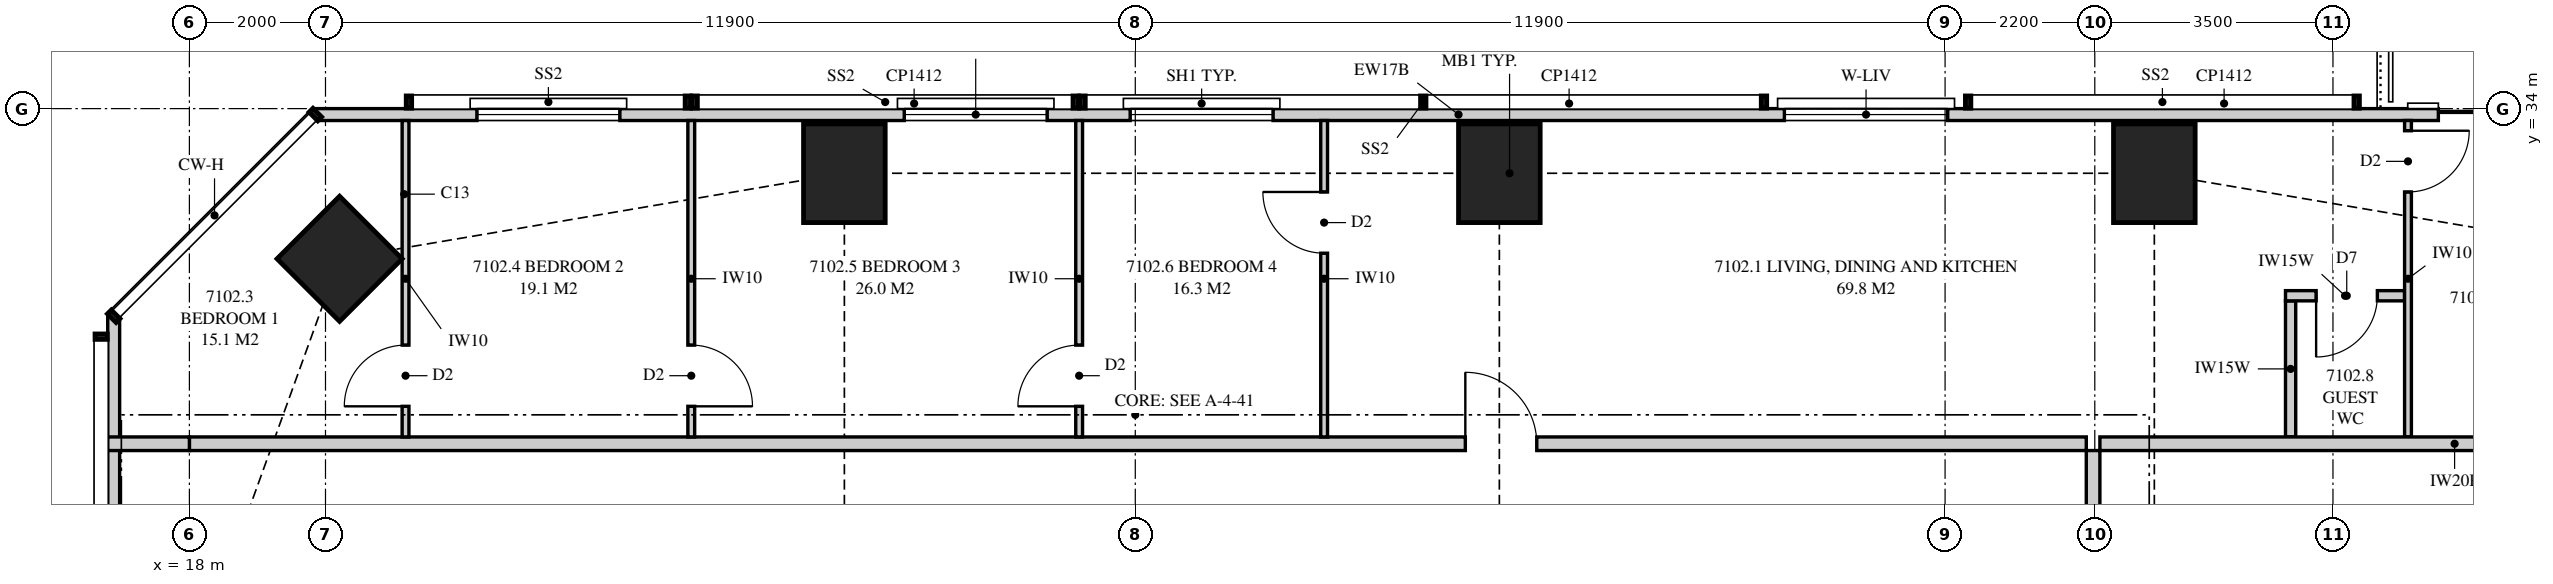
"""IFC4 building model, lengths in metres.
Left out: names, types, materials, properties, quantities, classifications, styles, units other than length and angle.
Written with IfcOpenShell. Run it as: python <this file> out.ifc"""

import sys

from ifc_helpers import new_model, si_unit, direction, frame, frame_2d, origin, origin_2d, place, context, subcontext, project, spatial, polyline, rectangle, outline, extrude, element, fill, save


model = new_model("IFC4")
c1 = context("Model", 3, precision=1e-05, world=origin(), true_north=direction((0.0, 1.0)))
c2 = subcontext(c1, "Body", "Model", "MODEL_VIEW")
j1 = project(units=[si_unit("LENGTHUNIT", "METRE"), si_unit("PLANEANGLEUNIT", "RADIAN")], contexts=[c1])
p1 = place(None, origin())
s1 = spatial("IfcSite", under=j1, at=p1, CompositionType="ELEMENT")
p2 = place(p1, origin())
s2 = spatial("IfcBuilding", under=s1, at=p2, CompositionType="ELEMENT")
p3 = place(p2, frame((0.0, 0.0, 259.95)))
s3 = spatial("IfcBuildingStorey", under=s2, at=p3, CompositionType="ELEMENT", Elevation=259.95)
for number, where, z_axis, x_axis in (
    (1, (46.875, 33.05, 0.0), (0.0, 0.0, 1.0), (0.0, 1.0, 0.0)),
    (2, (37.25, 33.05, 0.0), (0.0, 0.0, 1.0), (0.0, 1.0, 0.0)),
    (3, (27.625, 33.05, 0.0), (0.0, 0.0, 1.0), (0.0, 1.0, 0.0)),
):
    element("IfcColumn", number, at=place(p3, frame(where, z_axis=z_axis, x_axis=x_axis)), inside=s3, PredefinedType="COLUMN", context=c2, shape_type="SweptSolid", body=[
        extrude(rectangle(XDim=1.45, YDim=1.2, at=origin_2d()), origin(), (0.0, 0.0, 1.0), 3.9),
    ])
p4 = place(p3, frame((20.207, 31.793, 0.0), z_axis=(0.0, 0.0, 1.0), x_axis=(0.707106781187, 0.707106781187, 0.0)))
e4 = element("IfcColumn", 4, at=p4, inside=s3, PredefinedType="COLUMN", context=c2, shape_type="SweptSolid", body=[
    extrude(rectangle(XDim=1.3, YDim=1.3, at=origin_2d()), origin(), (0.0, 0.0, 1.0), 3.9),
])
p5 = place(p3, frame((53.449, 33.913, 0.0), z_axis=(0.0, 0.0, 1.0), x_axis=(-1.0, 0.0, 0.0)))
e5 = element("IfcWall", 5, at=p5, inside=s3, PredefinedType="SOLIDWALL", context=c2, shape_type="SweptSolid", body=[
    extrude(outline(polyline([(0.0, 0.0), (33.597, 0.0), (33.597, 3.66), (26.039, 3.66), (26.039, 2.7), (25.955, 2.7), (25.955, 3.66), (25.824, 3.66), (25.824, 2.7), (6.574, 2.7), (6.574, 3.66), (6.442, 3.66), (6.442, 2.7), (6.359, 2.7), (6.359, 3.66), (0.0, 3.66), (0.0, 0.0)])), frame((0.0, 0.087, 0.0), z_axis=(0.0, -1.0, 0.0), x_axis=(1.0, 0.0, 0.0)), (0.0, 0.0, 1.0), 0.175),
])
p6 = place(p5, frame((0.6, 0.0, 0.0)))
e6 = element("IfcOpeningElement", 6, at=p6, cuts=e5, PredefinedType="OPENING", context=c2, shape_type="SweptSolid", body=[
    extrude(rectangle(XDim=1.8, YDim=2.4, at=frame_2d((0.9, 1.2))), frame((0.0, 0.097, 0.0), z_axis=(0.0, -1.0, 0.0), x_axis=(1.0, 0.0, 0.0)), (0.0, 0.0, 1.0), 0.195),
])
p7 = place(p5, frame((9.61, 0.0, 0.4)))
e7 = element("IfcOpeningElement", 7, at=p7, cuts=e5, PredefinedType="OPENING", context=c2, shape_type="SweptSolid", body=[
    extrude(rectangle(XDim=2.4, YDim=2.0, at=frame_2d((1.2, 1.0))), frame((0.0, 0.097, 0.0), z_axis=(0.0, -1.0, 0.0), x_axis=(1.0, 0.0, 0.0)), (0.0, 0.0, 1.0), 0.195),
])
p8 = place(p5, frame((19.524, 0.0, 0.4)))
e8 = element("IfcOpeningElement", 8, at=p8, cuts=e5, PredefinedType="OPENING", context=c2, shape_type="SweptSolid", body=[
    extrude(rectangle(XDim=2.1, YDim=2.25, at=frame_2d((1.05, 1.125))), frame((0.0, 0.097, 0.0), z_axis=(0.0, -1.0, 0.0), x_axis=(1.0, 0.0, 0.0)), (0.0, 0.0, 1.0), 0.195),
])
p9 = place(p5, frame((22.844, 0.0, 0.4)))
e9 = element("IfcOpeningElement", 9, at=p9, cuts=e5, PredefinedType="OPENING", context=c2, shape_type="SweptSolid", body=[
    extrude(rectangle(XDim=2.1, YDim=2.25, at=frame_2d((1.05, 1.125))), frame((0.0, 0.097, 0.0), z_axis=(0.0, -1.0, 0.0), x_axis=(1.0, 0.0, 0.0)), (0.0, 0.0, 1.0), 0.195),
])
p10 = place(p5, frame((29.123, 0.0, 0.4)))
e10 = element("IfcOpeningElement", 10, at=p10, cuts=e5, PredefinedType="OPENING", context=c2, shape_type="SweptSolid", body=[
    extrude(rectangle(XDim=2.1, YDim=2.25, at=frame_2d((1.05, 1.125))), frame((0.0, 0.097, 0.0), z_axis=(0.0, -1.0, 0.0), x_axis=(1.0, 0.0, 0.0)), (0.0, 0.0, 1.0), 0.195),
])
p11 = place(p3, frame((16.887, 30.949, 0.0), z_axis=(0.0, 0.0, 1.0), x_axis=(0.0, -1.0, 0.0)))
e11 = element("IfcWall", 11, at=p11, inside=s3, PredefinedType="SOLIDWALL", context=c2, shape_type="SweptSolid", body=[
    extrude(outline(polyline([(0.0, 0.0), (27.897, 0.0), (27.897, 3.66), (18.148, 3.66), (18.148, 2.7), (18.125, 2.7), (18.125, 3.66), (17.949, 3.66), (17.949, 2.7), (5.949, 2.7), (5.949, 3.66), (0.0, 3.66), (0.0, 0.0)])), frame((0.0, 0.087, 0.0), z_axis=(0.0, -1.0, 0.0), x_axis=(1.0, 0.0, 0.0)), (0.0, 0.0, 1.0), 0.175),
])
p12 = place(p11, frame((11.849, 0.0, 0.4)))
e12 = element("IfcOpeningElement", 12, at=p12, cuts=e11, PredefinedType="OPENING", context=c2, shape_type="SweptSolid", body=[
    extrude(rectangle(XDim=1.2, YDim=2.0, at=frame_2d((0.6, 1.0))), frame((0.0, 0.097, 0.0), z_axis=(0.0, -1.0, 0.0), x_axis=(1.0, 0.0, 0.0)), (0.0, 0.0, 1.0), 0.195),
])
p13 = place(p3, frame((18.0, 29.075, 0.0), z_axis=(0.0, 0.0, 1.0), x_axis=(1.0, 0.0, 0.0)))
e13 = element("IfcWall", 13, at=p13, inside=s3, PredefinedType="PARTITIONING", context=c2, shape_type="SweptSolid", body=[
    extrude(outline(polyline([(0.0, 0.0), (27.875, 0.0), (27.875, 3.66), (27.875, 3.06), (27.565, 3.06), (27.565, 3.66), (20.56, 3.66), (20.56, 3.06), (17.94, 3.06), (17.94, 3.66), (10.935, 3.66), (10.935, 3.06), (8.315, 3.06), (8.315, 3.66), (2.192, 3.66), (2.192, 2.7), (0.256, 2.7), (0.256, 3.66), (0.0, 3.66), (0.0, 0.0)])), frame((0.0, 0.1, 0.0), z_axis=(0.0, -1.0, 0.0), x_axis=(1.0, 0.0, 0.0)), (0.0, 0.0, 1.0), 0.2),
])
p14 = place(p13, frame((18.75, 0.0, 0.0)))
e14 = element("IfcOpeningElement", 14, at=p14, cuts=e13, PredefinedType="OPENING", context=c2, shape_type="SweptSolid", body=[
    extrude(rectangle(XDim=1.05, YDim=2.2, at=frame_2d((0.525, 1.1))), frame((0.0, 0.11, 0.0), z_axis=(0.0, -1.0, 0.0), x_axis=(1.0, 0.0, 0.0)), (0.0, 0.0, 1.0), 0.22),
])
p15 = place(p3, frame((21.176, 33.825, 0.0), z_axis=(0.0, 0.0, 1.0), x_axis=(0.0, -1.0, 0.0)))
e15 = element("IfcWall", 15, at=p15, inside=s3, PredefinedType="PARTITIONING", context=c2, shape_type="SweptSolid", body=[
    extrude(outline(polyline([(0.0, 0.0), (4.65, 0.0), (4.65, 3.66), (2.74, 3.66), (2.74, 2.7), (0.996, 2.7), (0.996, 3.66), (0.0, 3.66), (0.0, 0.0)])), frame((0.0, 0.05, 0.0), z_axis=(0.0, -1.0, 0.0), x_axis=(1.0, 0.0, 0.0)), (0.0, 0.0, 1.0), 0.1),
])
p16 = place(p15, frame((3.3, 0.0, 0.0)))
e16 = element("IfcOpeningElement", 16, at=p16, cuts=e15, PredefinedType="OPENING", context=c2, shape_type="SweptSolid", body=[
    extrude(rectangle(XDim=0.9, YDim=2.1, at=frame_2d((0.45, 1.05))), frame((0.0, 0.06, 0.0), z_axis=(0.0, -1.0, 0.0), x_axis=(1.0, 0.0, 0.0)), (0.0, 0.0, 1.0), 0.12),
])
p17 = place(p3, frame((25.375, 33.825, 0.0), z_axis=(0.0, 0.0, 1.0), x_axis=(0.0, -1.0, 0.0)))
e17 = element("IfcWall", 17, at=p17, inside=s3, PredefinedType="PARTITIONING", context=c2, shape_type="SweptSolid", body=[
    extrude(outline(polyline([(0.0, 0.0), (4.65, 0.0), (4.65, 3.66), (2.029, 3.66), (2.029, 2.7), (0.284, 2.7), (0.284, 3.66), (0.0, 3.66), (0.0, 0.0)])), frame((0.0, 0.05, 0.0), z_axis=(0.0, -1.0, 0.0), x_axis=(1.0, 0.0, 0.0)), (0.0, 0.0, 1.0), 0.1),
])
p18 = place(p17, frame((3.3, 0.0, 0.0)))
e18 = element("IfcOpeningElement", 18, at=p18, cuts=e17, PredefinedType="OPENING", context=c2, shape_type="SweptSolid", body=[
    extrude(rectangle(XDim=0.9, YDim=2.1, at=frame_2d((0.45, 1.05))), frame((0.0, 0.06, 0.0), z_axis=(0.0, -1.0, 0.0), x_axis=(1.0, 0.0, 0.0)), (0.0, 0.0, 1.0), 0.12),
])
p19 = place(p3, frame((31.075, 33.825, 0.0), z_axis=(0.0, 0.0, 1.0), x_axis=(0.0, -1.0, 0.0)))
e19 = element("IfcWall", 19, at=p19, inside=s3, PredefinedType="PARTITIONING", context=c2, shape_type="SweptSolid", body=[
    extrude(outline(polyline([(0.0, 0.0), (4.65, 0.0), (4.65, 3.66), (1.635, 3.66), (1.635, 2.7), (0.0, 2.7), (0.0, 3.66), (0.0, 0.0)])), frame((0.0, 0.05, 0.0), z_axis=(0.0, -1.0, 0.0), x_axis=(1.0, 0.0, 0.0)), (0.0, 0.0, 1.0), 0.1),
])
p20 = place(p19, frame((3.3, 0.0, 0.0)))
e20 = element("IfcOpeningElement", 20, at=p20, cuts=e19, PredefinedType="OPENING", context=c2, shape_type="SweptSolid", body=[
    extrude(rectangle(XDim=0.9, YDim=2.1, at=frame_2d((0.45, 1.05))), frame((0.0, 0.06, 0.0), z_axis=(0.0, -1.0, 0.0), x_axis=(1.0, 0.0, 0.0)), (0.0, 0.0, 1.0), 0.12),
])
p21 = place(p3, frame((34.675, 33.825, 0.0), z_axis=(0.0, 0.0, 1.0), x_axis=(0.0, -1.0, 0.0)))
e21 = element("IfcWall", 21, at=p21, inside=s3, PredefinedType="PARTITIONING", context=c2, shape_type="SweptSolid", body=[
    extrude(outline(polyline([(0.0, 0.0), (4.65, 0.0), (4.65, 3.66), (1.635, 3.66), (1.635, 2.7), (0.0, 2.7), (0.0, 3.66), (0.0, 0.0)])), frame((0.0, 0.05, 0.0), z_axis=(0.0, -1.0, 0.0), x_axis=(1.0, 0.0, 0.0)), (0.0, 0.0, 1.0), 0.1),
])
p22 = place(p21, frame((1.05, 0.0, 0.0)))
e22 = element("IfcOpeningElement", 22, at=p22, cuts=e21, PredefinedType="OPENING", context=c2, shape_type="SweptSolid", body=[
    extrude(rectangle(XDim=0.9, YDim=2.1, at=frame_2d((0.45, 1.05))), frame((0.0, 0.06, 0.0), z_axis=(0.0, -1.0, 0.0), x_axis=(1.0, 0.0, 0.0)), (0.0, 0.0, 1.0), 0.12),
])
p23 = place(p3, frame((50.603, 33.825, 0.0), z_axis=(0.0, 0.0, 1.0), x_axis=(0.0, -1.0, 0.0)))
e23 = element("IfcWall", 23, at=p23, inside=s3, PredefinedType="PARTITIONING", context=c2, shape_type="SweptSolid", body=[
    extrude(outline(polyline([(0.0, 0.0), (4.65, 0.0), (4.65, 3.66), (2.279, 3.66), (2.279, 2.7), (0.534, 2.7), (0.534, 3.66), (0.0, 3.66), (0.0, 0.0)])), frame((0.0, 0.05, 0.0), z_axis=(0.0, -1.0, 0.0), x_axis=(1.0, 0.0, 0.0)), (0.0, 0.0, 1.0), 0.1),
])
p24 = place(p23, frame((0.15, 0.0, 0.0)))
e24 = element("IfcOpeningElement", 24, at=p24, cuts=e23, PredefinedType="OPENING", context=c2, shape_type="SweptSolid", body=[
    extrude(rectangle(XDim=0.9, YDim=2.1, at=frame_2d((0.45, 1.05))), frame((0.0, 0.06, 0.0), z_axis=(0.0, -1.0, 0.0), x_axis=(1.0, 0.0, 0.0)), (0.0, 0.0, 1.0), 0.12),
])
p25 = place(p3, frame((16.8, 29.075, 0.0), z_axis=(0.0, 0.0, 1.0), x_axis=(1.0, 0.0, 0.0)))
e25 = element("IfcWall", 25, at=p25, inside=s3, PredefinedType="PARTITIONING", context=c2, shape_type="SweptSolid", body=[
    extrude(rectangle(XDim=1.2, YDim=0.2, at=frame_2d((0.6, 0.0))), origin(), (0.0, 0.0, 1.0), 3.66),
])
p26 = place(p3, frame((46.075, 29.075, 0.0), z_axis=(0.0, 0.0, 1.0), x_axis=(1.0, 0.0, 0.0)))
e26 = element("IfcWall", 26, at=p26, inside=s3, PredefinedType="PARTITIONING", context=c2, shape_type="SweptSolid", body=[
    extrude(outline(polyline([(0.0, 0.0), (10.425, 0.0), (10.425, 3.66), (9.646, 3.66), (9.646, 2.7), (7.795, 2.7), (7.795, 3.66), (2.11, 3.66), (2.11, 3.06), (0.0, 3.06), (0.0, 3.66), (0.0, 0.0)])), frame((0.0, 0.1, 0.0), z_axis=(0.0, -1.0, 0.0), x_axis=(1.0, 0.0, 0.0)), (0.0, 0.0, 1.0), 0.2),
])
p27 = place(p3, frame((45.975, 25.0, 0.0), z_axis=(0.0, 0.0, 1.0), x_axis=(0.0, 1.0, 0.0)))
e27 = element("IfcWall", 27, at=p27, inside=s3, PredefinedType="PARTITIONING", context=c2, shape_type="SweptSolid", body=[
    extrude(rectangle(XDim=3.975, YDim=0.2, at=frame_2d((1.988, 0.0))), origin(), (0.0, 0.0, 1.0), 3.06),
])
p28 = place(p3, frame((50.552, 31.25, 0.0), z_axis=(0.0, 0.0, 1.0), x_axis=(-1.0, 0.0, 0.0)))
e28 = element("IfcWall", 28, at=p28, inside=s3, PredefinedType="PLUMBINGWALL", context=c2, shape_type="SweptSolid", body=[
    extrude(rectangle(XDim=1.75, YDim=0.15, at=frame_2d((0.875, 0.0))), origin(), (0.0, 0.0, 1.0), 3.66),
])
p29 = place(p28, frame((0.4, 0.0, 0.0)))
e29 = element("IfcOpeningElement", 29, at=p29, cuts=e28, PredefinedType="OPENING", context=c2, shape_type="SweptSolid", body=[
    extrude(rectangle(XDim=0.9, YDim=2.1, at=frame_2d((0.45, 1.05))), frame((0.0, 0.085, 0.0), z_axis=(0.0, -1.0, 0.0), x_axis=(1.0, 0.0, 0.0)), (0.0, 0.0, 1.0), 0.17),
])
p30 = place(p3, frame((48.877, 29.175, 0.0), z_axis=(0.0, 0.0, 1.0), x_axis=(0.0, 1.0, 0.0)))
e30 = element("IfcWall", 30, at=p30, inside=s3, PredefinedType="PLUMBINGWALL", context=c2, shape_type="SweptSolid", body=[
    extrude(rectangle(XDim=2.0, YDim=0.15, at=frame_2d((1.0, 0.0))), origin(), (0.0, 0.0, 1.0), 3.66),
])
p31 = place(p6, origin())
e31 = element("IfcDoor", 31, at=p31, inside=s3, OperationType="SLIDING_TO_LEFT", PredefinedType="DOOR", context=c2, shape_type="SweptSolid", body=[
    extrude(rectangle(XDim=1.8, YDim=2.4, at=frame_2d((0.9, 1.2))), frame((0.0, 0.025, 0.0), z_axis=(0.0, -1.0, 0.0), x_axis=(1.0, 0.0, 0.0)), (0.0, 0.0, 1.0), 0.05),
])
fill(e6, e31)
p32 = place(p7, origin())
e32 = element("IfcWindow", 32, at=p32, inside=s3, PartitioningType="SINGLE_PANEL", PredefinedType="WINDOW", context=c2, shape_type="SweptSolid", body=[
    extrude(rectangle(XDim=2.4, YDim=2.0, at=frame_2d((1.2, 1.0))), frame((0.0, 0.03, 0.0), z_axis=(0.0, -1.0, 0.0), x_axis=(1.0, 0.0, 0.0)), (0.0, 0.0, 1.0), 0.06),
])
fill(e7, e32)
p33 = place(p8, origin())
e33 = element("IfcWindow", 33, at=p33, inside=s3, PartitioningType="SINGLE_PANEL", PredefinedType="WINDOW", context=c2, shape_type="SweptSolid", body=[
    extrude(rectangle(XDim=2.1, YDim=2.25, at=frame_2d((1.05, 1.125))), frame((0.0, 0.03, 0.0), z_axis=(0.0, -1.0, 0.0), x_axis=(1.0, 0.0, 0.0)), (0.0, 0.0, 1.0), 0.06),
])
fill(e8, e33)
p34 = place(p9, origin())
e34 = element("IfcWindow", 34, at=p34, inside=s3, PartitioningType="SINGLE_PANEL", PredefinedType="WINDOW", context=c2, shape_type="SweptSolid", body=[
    extrude(rectangle(XDim=2.1, YDim=2.25, at=frame_2d((1.05, 1.125))), frame((0.0, 0.03, 0.0), z_axis=(0.0, -1.0, 0.0), x_axis=(1.0, 0.0, 0.0)), (0.0, 0.0, 1.0), 0.06),
])
fill(e9, e34)
p35 = place(p10, origin())
e35 = element("IfcWindow", 35, at=p35, inside=s3, PartitioningType="SINGLE_PANEL", PredefinedType="WINDOW", context=c2, shape_type="SweptSolid", body=[
    extrude(rectangle(XDim=2.1, YDim=2.25, at=frame_2d((1.05, 1.125))), frame((0.0, 0.03, 0.0), z_axis=(0.0, -1.0, 0.0), x_axis=(1.0, 0.0, 0.0)), (0.0, 0.0, 1.0), 0.06),
])
fill(e10, e35)
p36 = place(p14, origin())
e36 = element("IfcDoor", 36, at=p36, inside=s3, OperationType="SINGLE_SWING_LEFT", PredefinedType="DOOR", context=c2, shape_type="SweptSolid", body=[
    extrude(rectangle(XDim=1.05, YDim=2.2, at=frame_2d((0.525, 1.1))), frame((0.0, 0.025, 0.0), z_axis=(0.0, -1.0, 0.0), x_axis=(1.0, 0.0, 0.0)), (0.0, 0.0, 1.0), 0.05),
])
fill(e14, e36)
p37 = place(p16, frame((0.9, 0.0, 0.0), z_axis=(0.0, 0.0, 1.0), x_axis=(-1.0, 0.0, 0.0)))
e37 = element("IfcDoor", 37, at=p37, inside=s3, OperationType="SINGLE_SWING_LEFT", PredefinedType="DOOR", context=c2, shape_type="SweptSolid", body=[
    extrude(rectangle(XDim=0.9, YDim=2.1, at=frame_2d((0.45, 1.05))), frame((0.0, 0.025, 0.0), z_axis=(0.0, -1.0, 0.0), x_axis=(1.0, 0.0, 0.0)), (0.0, 0.0, 1.0), 0.05),
])
fill(e16, e37)
p38 = place(p18, origin())
e38 = element("IfcDoor", 38, at=p38, inside=s3, OperationType="SINGLE_SWING_RIGHT", PredefinedType="DOOR", context=c2, shape_type="SweptSolid", body=[
    extrude(rectangle(XDim=0.9, YDim=2.1, at=frame_2d((0.45, 1.05))), frame((0.0, 0.025, 0.0), z_axis=(0.0, -1.0, 0.0), x_axis=(1.0, 0.0, 0.0)), (0.0, 0.0, 1.0), 0.05),
])
fill(e18, e38)
p39 = place(p20, frame((0.9, 0.0, 0.0), z_axis=(0.0, 0.0, 1.0), x_axis=(-1.0, 0.0, 0.0)))
e39 = element("IfcDoor", 39, at=p39, inside=s3, OperationType="SINGLE_SWING_LEFT", PredefinedType="DOOR", context=c2, shape_type="SweptSolid", body=[
    extrude(rectangle(XDim=0.9, YDim=2.1, at=frame_2d((0.45, 1.05))), frame((0.0, 0.025, 0.0), z_axis=(0.0, -1.0, 0.0), x_axis=(1.0, 0.0, 0.0)), (0.0, 0.0, 1.0), 0.05),
])
fill(e20, e39)
p40 = place(p22, frame((0.9, 0.0, 0.0), z_axis=(0.0, 0.0, 1.0), x_axis=(-1.0, 0.0, 0.0)))
e40 = element("IfcDoor", 40, at=p40, inside=s3, OperationType="SINGLE_SWING_RIGHT", PredefinedType="DOOR", context=c2, shape_type="SweptSolid", body=[
    extrude(rectangle(XDim=0.9, YDim=2.1, at=frame_2d((0.45, 1.05))), frame((0.0, 0.025, 0.0), z_axis=(0.0, -1.0, 0.0), x_axis=(1.0, 0.0, 0.0)), (0.0, 0.0, 1.0), 0.05),
])
fill(e22, e40)
p41 = place(p24, origin())
e41 = element("IfcDoor", 41, at=p41, inside=s3, OperationType="SINGLE_SWING_LEFT", PredefinedType="DOOR", context=c2, shape_type="SweptSolid", body=[
    extrude(rectangle(XDim=0.9, YDim=2.1, at=frame_2d((0.45, 1.05))), frame((0.0, 0.025, 0.0), z_axis=(0.0, -1.0, 0.0), x_axis=(1.0, 0.0, 0.0)), (0.0, 0.0, 1.0), 0.05),
])
fill(e24, e41)
p42 = place(p29, origin())
e42 = element("IfcDoor", 42, at=p42, inside=s3, OperationType="SINGLE_SWING_RIGHT", PredefinedType="DOOR", context=c2, shape_type="SweptSolid", body=[
    extrude(rectangle(XDim=0.9, YDim=2.1, at=frame_2d((0.45, 1.05))), frame((0.0, 0.025, 0.0), z_axis=(0.0, -1.0, 0.0), x_axis=(1.0, 0.0, 0.0)), (0.0, 0.0, 1.0), 0.05),
])
fill(e29, e42)
save(model, sys.argv[1])
